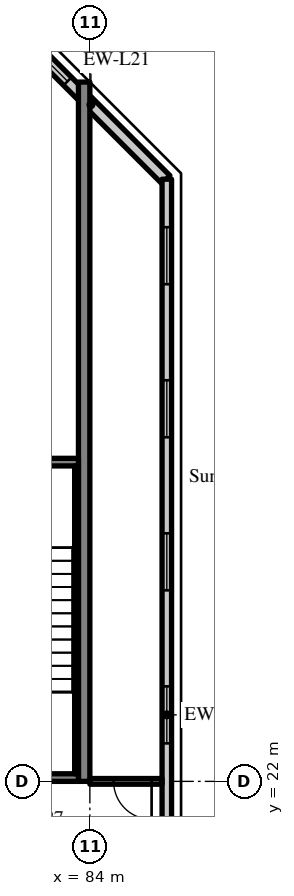
"""IFC4 building model, lengths in metres.
Left out: names, types, materials, properties, quantities, classifications, styles, units other than length and angle.
Written with IfcOpenShell. Run it as: python <this file> out.ifc"""

import sys

from ifc_helpers import new_model, si_unit, direction, frame, frame_2d, origin, place, context, subcontext, project, spatial, rectangle, extrude, source, transform, mapped, element, fill, save


model = new_model("IFC4")
c1 = context("Model", 3, precision=1e-05, world=origin(), true_north=direction((0.0, 1.0)))
c2 = subcontext(c1, "Body", "Model", "MODEL_VIEW")
j1 = project(units=[si_unit("LENGTHUNIT", "METRE"), si_unit("PLANEANGLEUNIT", "RADIAN")], contexts=[c1])
p1 = place(None, origin())
s1 = spatial("IfcSite", under=j1, at=p1, CompositionType="ELEMENT")
p2 = place(p1, origin())
s2 = spatial("IfcBuilding", under=s1, at=p2, CompositionType="ELEMENT")
p3 = place(p2, frame((0.0, 0.0, 260.8)))
s3 = spatial("IfcBuildingStorey", under=s2, at=p3, CompositionType="ELEMENT", Elevation=260.8)
m1 = source(origin(), c2, "Body", "SweptSolid", [
    extrude(rectangle(XDim=18.4, YDim=0.3, at=frame_2d((9.2, 0.0))), origin(), (0.0, 0.0, 1.0), 3.62),
])
p4 = place(p3, frame((83.85, 22.0, 0.0), z_axis=(0.0, 0.0, 1.0), x_axis=(0.0, 1.0, 0.0)))
e1 = element("IfcWall", 1, at=p4, inside=s3, PredefinedType="SHEAR", context=c2, shape_type="MappedRepresentation", body=[
    mapped(m1, transform((0.0, 0.0, 0.0), scale=1.0)),
])
m2 = source(origin(), c2, "Body", "SweptSolid", [
    extrude(rectangle(XDim=5.576, YDim=0.3, at=frame_2d((2.788, 0.0))), origin(), (0.0, 0.0, 1.0), 3.62),
])
p5 = place(p3, frame((86.0, 37.834, 0.0), z_axis=(0.0, 0.0, 1.0), x_axis=(-0.707106781187, 0.707106781187, 0.0)))
e2 = element("IfcWall", 2, at=p5, inside=s3, PredefinedType="SOLIDWALL", context=c2, shape_type="MappedRepresentation", body=[
    mapped(m2, transform((0.0, 0.0, 0.0), scale=1.0)),
])
m3 = source(origin(), c2, "Body", "SweptSolid", [
    extrude(rectangle(XDim=1.8, YDim=1.5, at=frame_2d((0.9, 0.75))), frame((0.0, 0.16, 0.0), z_axis=(0.0, -1.0, 0.0), x_axis=(1.0, 0.0, 0.0)), (0.0, 0.0, 1.0), 0.32),
])
p6 = place(p5, frame((3.658, 0.0, 0.9)))
e3 = element("IfcOpeningElement", 3, at=p6, cuts=e2, PredefinedType="OPENING", context=c2, shape_type="MappedRepresentation", body=[
    mapped(m3, transform((0.0, 0.0, 0.0), scale=1.0)),
])
m4 = source(origin(), c2, "Body", "SweptSolid", [
    extrude(rectangle(XDim=28.189, YDim=0.25, at=frame_2d((14.095, 0.0))), origin(), (0.0, 0.0, 1.0), 3.62),
])
p7 = place(p3, frame((86.025, 9.655, 0.0), z_axis=(0.0, 0.0, 1.0), x_axis=(0.0, 1.0, 0.0)))
e4 = element("IfcWall", 4, at=p7, inside=s3, PredefinedType="SOLIDWALL", context=c2, shape_type="MappedRepresentation", body=[
    mapped(m4, transform((0.0, 0.0, 0.0), scale=1.0)),
])
m5 = source(origin(), c2, "Body", "SweptSolid", [
    extrude(rectangle(XDim=1.5, YDim=1.5, at=frame_2d((0.75, 0.75))), frame((0.0, 0.135, 0.0), z_axis=(0.0, -1.0, 0.0), x_axis=(1.0, 0.0, 0.0)), (0.0, 0.0, 1.0), 0.27),
])
p8 = place(p7, frame((1.263, 0.0, 0.9)))
e5 = element("IfcOpeningElement", 5, at=p8, cuts=e4, PredefinedType="OPENING", context=c2, shape_type="MappedRepresentation", body=[
    mapped(m5, transform((0.0, 0.0, 0.0), scale=1.0)),
])
p9 = place(p7, frame((5.291, 0.0, 0.9)))
e6 = element("IfcOpeningElement", 6, at=p9, cuts=e4, PredefinedType="OPENING", context=c2, shape_type="MappedRepresentation", body=[
    mapped(m5, transform((0.0, 0.0, 0.0), scale=1.0)),
])
p10 = place(p7, frame((9.318, 0.0, 0.9)))
e7 = element("IfcOpeningElement", 7, at=p10, cuts=e4, PredefinedType="OPENING", context=c2, shape_type="MappedRepresentation", body=[
    mapped(m5, transform((0.0, 0.0, 0.0), scale=1.0)),
])
p11 = place(p7, frame((13.345, 0.0, 0.9)))
e8 = element("IfcOpeningElement", 8, at=p11, cuts=e4, PredefinedType="OPENING", context=c2, shape_type="MappedRepresentation", body=[
    mapped(m5, transform((0.0, 0.0, 0.0), scale=1.0)),
])
p12 = place(p7, frame((17.372, 0.0, 0.9)))
e9 = element("IfcOpeningElement", 9, at=p12, cuts=e4, PredefinedType="OPENING", context=c2, shape_type="MappedRepresentation", body=[
    mapped(m5, transform((0.0, 0.0, 0.0), scale=1.0)),
])
p13 = place(p7, frame((21.399, 0.0, 0.9)))
e10 = element("IfcOpeningElement", 10, at=p13, cuts=e4, PredefinedType="OPENING", context=c2, shape_type="MappedRepresentation", body=[
    mapped(m5, transform((0.0, 0.0, 0.0), scale=1.0)),
])
p14 = place(p7, frame((25.426, 0.0, 0.9)))
e11 = element("IfcOpeningElement", 11, at=p14, cuts=e4, PredefinedType="OPENING", context=c2, shape_type="MappedRepresentation", body=[
    mapped(m5, transform((0.0, 0.0, 0.0), scale=1.0)),
])
m6 = source(origin(), c2, "Body", "SweptSolid", [
    extrude(rectangle(XDim=8.1, YDim=0.2, at=frame_2d((4.05, 0.0))), origin(), (0.0, 0.0, 1.0), 3.62),
])
p15 = place(p3, frame((83.7, 22.1, 0.0), z_axis=(0.0, 0.0, 1.0), x_axis=(-1.0, 0.0, 0.0)))
e12 = element("IfcWall", 12, at=p15, inside=s3, PredefinedType="SOLIDWALL", context=c2, shape_type="MappedRepresentation", body=[
    mapped(m6, transform((0.0, 0.0, 0.0), scale=1.0)),
])
m7 = source(origin(), c2, "Body", "SweptSolid", [
    extrude(rectangle(XDim=1.2, YDim=2.1, at=frame_2d((0.6, 1.05))), frame((0.0, 0.11, 0.0), z_axis=(0.0, -1.0, 0.0), x_axis=(1.0, 0.0, 0.0)), (0.0, 0.0, 1.0), 0.22),
])
p16 = place(p15, frame((5.9, 0.0, 0.0)))
e13 = element("IfcOpeningElement", 13, at=p16, cuts=e12, PredefinedType="OPENING", context=c2, shape_type="MappedRepresentation", body=[
    mapped(m7, transform((0.0, 0.0, 0.0), scale=1.0)),
])
p17 = place(p3, frame((83.7, 30.4, 0.0), z_axis=(0.0, 0.0, 1.0), x_axis=(-1.0, 0.0, 0.0)))
e14 = element("IfcWall", 14, at=p17, inside=s3, PredefinedType="SOLIDWALL", context=c2, shape_type="MappedRepresentation", body=[
    mapped(m6, transform((0.0, 0.0, 0.0), scale=1.0)),
])
m8 = source(origin(), c2, "Body", "SweptSolid", [
    extrude(rectangle(XDim=1.0, YDim=2.1, at=frame_2d((0.5, 1.05))), frame((0.0, 0.11, 0.0), z_axis=(0.0, -1.0, 0.0), x_axis=(1.0, 0.0, 0.0)), (0.0, 0.0, 1.0), 0.22),
])
p18 = place(p17, frame((6.0, 0.0, 0.0)))
e15 = element("IfcOpeningElement", 15, at=p18, cuts=e14, PredefinedType="OPENING", context=c2, shape_type="MappedRepresentation", body=[
    mapped(m8, transform((0.0, 0.0, 0.0), scale=1.0)),
])
m9 = source(origin(), c2, "Body", "SweptSolid", [
    extrude(rectangle(XDim=8.1, YDim=0.1, at=frame_2d((4.05, 0.0))), origin(), (0.0, 0.0, 1.0), 3.62),
])
p19 = place(p3, frame((83.65, 22.2, 0.0), z_axis=(0.0, 0.0, 1.0), x_axis=(0.0, 1.0, 0.0)))
e16 = element("IfcWall", 16, at=p19, inside=s3, PredefinedType="SOLIDWALL", context=c2, shape_type="MappedRepresentation", body=[
    mapped(m9, transform((0.0, 0.0, 0.0), scale=1.0)),
])
m10 = source(origin(), c2, "Body", "SweptSolid", [
    extrude(rectangle(XDim=1.9, YDim=0.15, at=frame_2d((0.95, 0.0))), origin(), (0.0, 0.0, 1.0), 2.92),
])
p20 = place(p3, frame((84.0, 22.0, 0.0), z_axis=(0.0, 0.0, 1.0), x_axis=(1.0, 0.0, 0.0)))
e17 = element("IfcWall", 17, at=p20, inside=s3, PredefinedType="PARTITIONING", context=c2, shape_type="MappedRepresentation", body=[
    mapped(m10, transform((0.0, 0.0, 0.0), scale=1.0)),
])
m11 = source(origin(), c2, "Body", "SweptSolid", [
    extrude(rectangle(XDim=1.0, YDim=2.1, at=frame_2d((0.5, 1.05))), frame((0.0, 0.085, 0.0), z_axis=(0.0, -1.0, 0.0), x_axis=(1.0, 0.0, 0.0)), (0.0, 0.0, 1.0), 0.17),
])
p21 = place(p20, frame((0.625, 0.0, 0.0)))
e18 = element("IfcOpeningElement", 18, at=p21, cuts=e17, PredefinedType="OPENING", context=c2, shape_type="MappedRepresentation", body=[
    mapped(m11, transform((0.0, 0.0, 0.0), scale=1.0)),
])
m12 = source(origin(), c2, "Body", "SweptSolid", [
    extrude(rectangle(XDim=1.8, YDim=1.5, at=frame_2d((0.9, 0.75))), frame((0.0, 0.03, 0.0), z_axis=(0.0, -1.0, 0.0), x_axis=(1.0, 0.0, 0.0)), (0.0, 0.0, 1.0), 0.06),
])
p22 = place(p6, origin())
e19 = element("IfcWindow", 19, at=p22, inside=s3, PartitioningType="SINGLE_PANEL", PredefinedType="WINDOW", context=c2, shape_type="MappedRepresentation", body=[
    mapped(m12, transform((0.0, 0.0, 0.0), scale=1.0)),
])
fill(e3, e19)
m13 = source(origin(), c2, "Body", "SweptSolid", [
    extrude(rectangle(XDim=1.5, YDim=1.5, at=frame_2d((0.75, 0.75))), frame((0.0, 0.03, 0.0), z_axis=(0.0, -1.0, 0.0), x_axis=(1.0, 0.0, 0.0)), (0.0, 0.0, 1.0), 0.06),
])
p23 = place(p11, origin())
e20 = element("IfcWindow", 20, at=p23, inside=s3, PartitioningType="SINGLE_PANEL", PredefinedType="WINDOW", context=c2, shape_type="MappedRepresentation", body=[
    mapped(m13, transform((0.0, 0.0, 0.0), scale=1.0)),
])
fill(e8, e20)
p24 = place(p12, origin())
e21 = element("IfcWindow", 21, at=p24, inside=s3, PartitioningType="SINGLE_PANEL", PredefinedType="WINDOW", context=c2, shape_type="MappedRepresentation", body=[
    mapped(m13, transform((0.0, 0.0, 0.0), scale=1.0)),
])
fill(e9, e21)
p25 = place(p13, origin())
e22 = element("IfcWindow", 22, at=p25, inside=s3, PartitioningType="SINGLE_PANEL", PredefinedType="WINDOW", context=c2, shape_type="MappedRepresentation", body=[
    mapped(m13, transform((0.0, 0.0, 0.0), scale=1.0)),
])
fill(e10, e22)
p26 = place(p14, origin())
e23 = element("IfcWindow", 23, at=p26, inside=s3, PartitioningType="SINGLE_PANEL", PredefinedType="WINDOW", context=c2, shape_type="MappedRepresentation", body=[
    mapped(m13, transform((0.0, 0.0, 0.0), scale=1.0)),
])
fill(e11, e23)
m14 = source(origin(), c2, "Body", "SweptSolid", [
    extrude(rectangle(XDim=1.0, YDim=2.1, at=frame_2d((0.5, 1.05))), frame((0.0, 0.025, 0.0), z_axis=(0.0, -1.0, 0.0), x_axis=(1.0, 0.0, 0.0)), (0.0, 0.0, 1.0), 0.05),
])
p27 = place(p21, origin())
e24 = element("IfcDoor", 24, at=p27, inside=s3, OperationType="SINGLE_SWING_RIGHT", PredefinedType="DOOR", context=c2, shape_type="MappedRepresentation", body=[
    mapped(m14, transform((0.0, 0.0, 0.0), scale=1.0)),
])
fill(e18, e24)
save(model, sys.argv[1])
